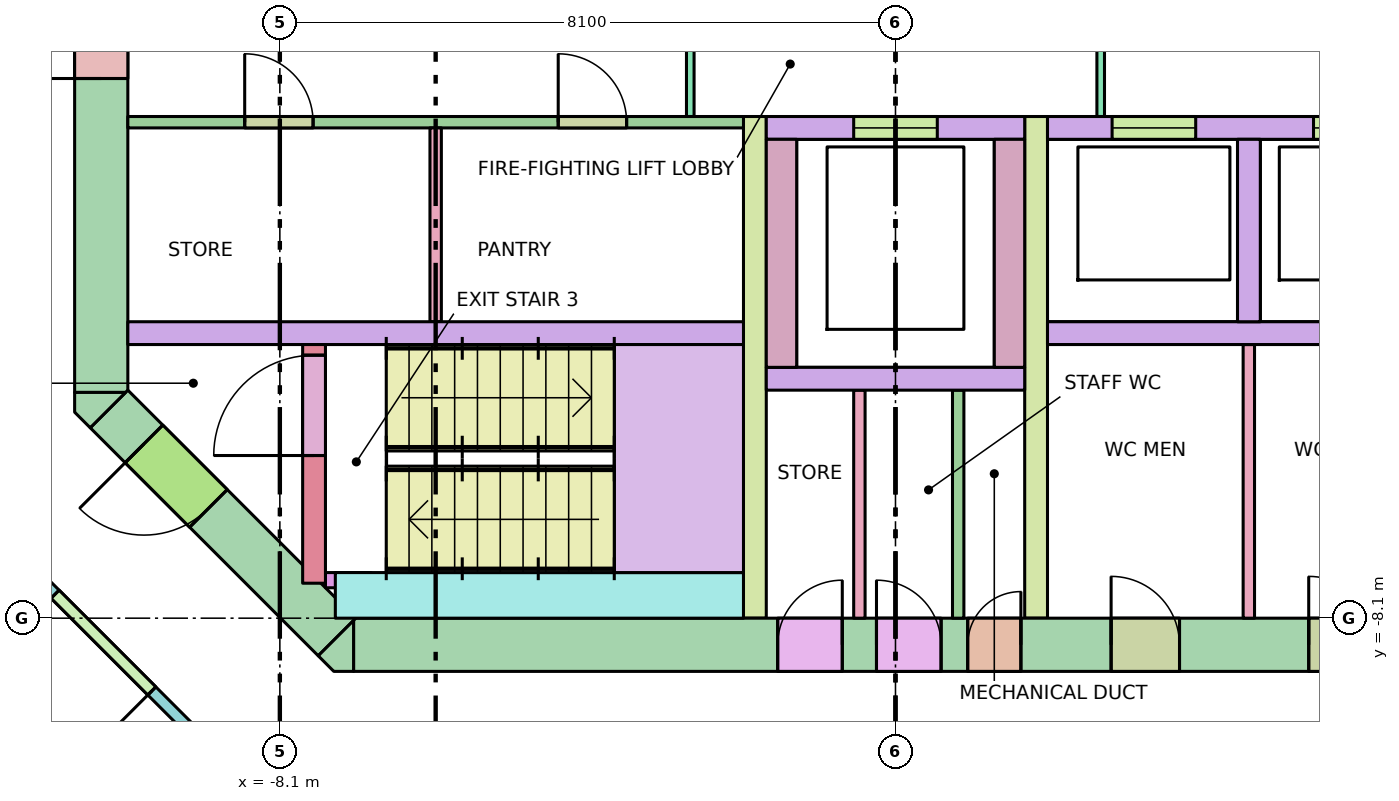
"""IFC4 building model, lengths in metres.
Left out: names, types, materials, properties, quantities, classifications, styles, units other than length and angle.
Written with IfcOpenShell. Run it as: python <this file> out.ifc"""

import sys

from ifc_helpers import new_model, si_unit, direction, frame, frame_2d, origin, place, context, subcontext, project, spatial, polyline, rectangle, outline, extrude, element, fill, save


model = new_model("IFC4")
c1 = context("Model", 3, precision=1e-05, world=origin(), true_north=direction((0.0, 1.0)))
c2 = subcontext(c1, "Body", "Model", "MODEL_VIEW")
j1 = project(units=[si_unit("LENGTHUNIT", "METRE"), si_unit("PLANEANGLEUNIT", "RADIAN")], contexts=[c1])
p1 = place(None, origin())
s1 = spatial("IfcSite", under=j1, at=p1, CompositionType="ELEMENT")
p2 = place(p1, origin())
s2 = spatial("IfcBuilding", under=s1, at=p2, CompositionType="ELEMENT")
p3 = place(p2, frame((0.0, 0.0, 203.9)))
s3 = spatial("IfcBuildingStorey", under=s2, at=p3, CompositionType="ELEMENT", Elevation=203.9)
p4 = place(p3, frame((-7.13, -8.45, -0.28), z_axis=(0.0, 0.0, 1.0), x_axis=(1.0, 0.0, 0.0)))
e1 = element("IfcWall", 1, at=p4, inside=s3, PredefinedType="SHEAR", context=c2, shape_type="SweptSolid", body=[
    extrude(rectangle(XDim=14.26, YDim=0.7, at=frame_2d((7.13, 0.0))), origin(), (0.0, 0.0, 1.0), 3.7),
])
p5 = place(p4, frame((8.08, 0.0, 0.28)))
e2 = element("IfcOpeningElement", 2, at=p5, cuts=e1, PredefinedType="OPENING", context=c2, shape_type="SweptSolid", body=[
    extrude(rectangle(XDim=0.7, YDim=2.1, at=frame_2d((0.35, 1.05))), frame((0.0, 0.36, 0.0), z_axis=(0.0, -1.0, 0.0), x_axis=(1.0, 0.0, 0.0)), (0.0, 0.0, 1.0), 0.72),
])
p6 = place(p4, frame((5.58, 0.0, 0.28)))
e3 = element("IfcOpeningElement", 3, at=p6, cuts=e1, PredefinedType="OPENING", context=c2, shape_type="SweptSolid", body=[
    extrude(rectangle(XDim=0.85, YDim=2.1, at=frame_2d((0.425, 1.05))), frame((0.0, 0.36, 0.0), z_axis=(0.0, -1.0, 0.0), x_axis=(1.0, 0.0, 0.0)), (0.0, 0.0, 1.0), 0.72),
])
p7 = place(p4, frame((6.88, 0.0, 0.28)))
e4 = element("IfcOpeningElement", 4, at=p7, cuts=e1, PredefinedType="OPENING", context=c2, shape_type="SweptSolid", body=[
    extrude(rectangle(XDim=0.85, YDim=2.1, at=frame_2d((0.425, 1.05))), frame((0.0, 0.36, 0.0), z_axis=(0.0, -1.0, 0.0), x_axis=(1.0, 0.0, 0.0)), (0.0, 0.0, 1.0), 0.72),
])
p8 = place(p4, frame((9.967, 0.0, 0.28)))
e5 = element("IfcOpeningElement", 5, at=p8, cuts=e1, PredefinedType="OPENING", context=c2, shape_type="SweptSolid", body=[
    extrude(rectangle(XDim=0.9, YDim=2.1, at=frame_2d((0.45, 1.05))), frame((0.0, 0.36, 0.0), z_axis=(0.0, -1.0, 0.0), x_axis=(1.0, 0.0, 0.0)), (0.0, 0.0, 1.0), 0.72),
])
p9 = place(p4, frame((12.567, 0.0, 0.28)))
e6 = element("IfcOpeningElement", 6, at=p9, cuts=e1, PredefinedType="OPENING", context=c2, shape_type="SweptSolid", body=[
    extrude(rectangle(XDim=0.9, YDim=2.1, at=frame_2d((0.45, 1.05))), frame((0.0, 0.36, 0.0), z_axis=(0.0, -1.0, 0.0), x_axis=(1.0, 0.0, 0.0)), (0.0, 0.0, 1.0), 0.72),
])
p10 = place(p3, frame((-10.45, -5.13, -0.28), z_axis=(0.0, 0.0, 1.0), x_axis=(0.0, 1.0, 0.0)))
e7 = element("IfcWall", 7, at=p10, inside=s3, PredefinedType="SHEAR", context=c2, shape_type="SweptSolid", body=[
    extrude(rectangle(XDim=10.26, YDim=0.7, at=frame_2d((5.13, 0.0))), origin(), (0.0, 0.0, 1.0), 3.7),
])
p11 = place(p10, frame((4.13, 0.0, 0.28)))
e8 = element("IfcOpeningElement", 8, at=p11, cuts=e7, PredefinedType="OPENING", context=c2, shape_type="SweptSolid", body=[
    extrude(rectangle(XDim=2.0, YDim=2.1, at=frame_2d((1.0, 1.05))), frame((0.0, 0.36, 0.0), z_axis=(0.0, -1.0, 0.0), x_axis=(1.0, 0.0, 0.0)), (0.0, 0.0, 1.0), 0.72),
])
p12 = place(p3, frame((-7.347, -8.347, -0.28), z_axis=(0.0, 0.0, 1.0), x_axis=(-0.707106781187, 0.707106781187, 0.0)))
e9 = element("IfcWall", 9, at=p12, inside=s3, PredefinedType="SHEAR", context=c2, shape_type="SweptSolid", body=[
    extrude(rectangle(XDim=4.243, YDim=0.7, at=frame_2d((2.121, 0.0))), origin(), (0.0, 0.0, 1.0), 3.7),
])
p13 = place(p12, frame((2.393, 0.0, 0.28)))
e10 = element("IfcOpeningElement", 10, at=p13, cuts=e9, PredefinedType="OPENING", context=c2, shape_type="SweptSolid", body=[
    extrude(rectangle(XDim=1.2, YDim=2.1, at=frame_2d((0.6, 1.05))), frame((0.0, 0.36, 0.0), z_axis=(0.0, -1.0, 0.0), x_axis=(1.0, 0.0, 0.0)), (0.0, 0.0, 1.0), 0.72),
])
p14 = place(p3, frame((0.0, 0.0, -0.28)))
e11 = element("IfcWall", 11, at=p14, inside=s3, PredefinedType="SHEAR", context=c2, shape_type="SweptSolid", body=[
    extrude(outline(polyline([(-7.39, -8.8), (-7.595, -8.595), (-7.595, -8.595), (-7.595, -8.595), (-7.13, -8.13), (-7.13, -8.8), (-7.13, -8.8), (-7.39, -8.8)])), origin(), (0.0, 0.0, 1.0), 3.7),
])
p15 = place(p3, frame((0.0, 0.0, -0.28)))
e12 = element("IfcWall", 12, at=p15, inside=s3, PredefinedType="SHEAR", context=c2, shape_type="SweptSolid", body=[
    extrude(outline(polyline([(-10.8, -5.39), (-10.8, -5.13), (-10.8, -5.13), (-10.13, -5.13), (-10.595, -5.595), (-10.595, -5.595), (-10.595, -5.595), (-10.8, -5.39)])), origin(), (0.0, 0.0, 1.0), 3.7),
])
for number, where, z_axis, x_axis in (
    (13, (-10.1, -4.35, 0.0), (0.0, 0.0, 1.0), (1.0, 0.0, 0.0)),
    (14, (2.0, -4.35, 0.0), (0.0, 0.0, 1.0), (1.0, 0.0, 0.0)),
):
    element("IfcWall", number, at=place(p3, frame(where, z_axis=z_axis, x_axis=x_axis)), inside=s3, PredefinedType="SOLIDWALL", context=c2, shape_type="SweptSolid", body=[
        extrude(rectangle(XDim=8.1, YDim=0.3, at=frame_2d((4.05, 0.0))), origin(), (0.0, 0.0, 1.0), 3.42),
    ])
p16 = place(p3, frame((2.0, -1.65, 0.0), z_axis=(0.0, 0.0, 1.0), x_axis=(1.0, 0.0, 0.0)))
e15 = element("IfcWall", 15, at=p16, inside=s3, PredefinedType="SOLIDWALL", context=c2, shape_type="SweptSolid", body=[
    extrude(rectangle(XDim=8.1, YDim=0.3, at=frame_2d((4.05, 0.0))), origin(), (0.0, 0.0, 1.0), 3.42),
])
p17 = place(p16, frame((0.85, 0.0, 0.0)))
e16 = element("IfcOpeningElement", 16, at=p17, cuts=e15, PredefinedType="OPENING", context=c2, shape_type="SweptSolid", body=[
    extrude(rectangle(XDim=1.1, YDim=2.1, at=frame_2d((0.55, 1.05))), frame((0.0, 0.16, 0.0), z_axis=(0.0, -1.0, 0.0), x_axis=(1.0, 0.0, 0.0)), (0.0, 0.0, 1.0), 0.32),
])
p18 = place(p16, frame((3.5, 0.0, 0.0)))
e17 = element("IfcOpeningElement", 17, at=p18, cuts=e15, PredefinedType="OPENING", context=c2, shape_type="SweptSolid", body=[
    extrude(rectangle(XDim=1.1, YDim=2.1, at=frame_2d((0.55, 1.05))), frame((0.0, 0.16, 0.0), z_axis=(0.0, -1.0, 0.0), x_axis=(1.0, 0.0, 0.0)), (0.0, 0.0, 1.0), 0.32),
])
p19 = place(p16, frame((6.3, 0.0, 0.0)))
e18 = element("IfcOpeningElement", 18, at=p19, cuts=e15, PredefinedType="OPENING", context=c2, shape_type="SweptSolid", body=[
    extrude(rectangle(XDim=1.1, YDim=2.1, at=frame_2d((0.55, 1.05))), frame((0.0, 0.16, 0.0), z_axis=(0.0, -1.0, 0.0), x_axis=(1.0, 0.0, 0.0)), (0.0, 0.0, 1.0), 0.32),
])
p20 = place(p3, frame((4.65, -4.2, 0.0), z_axis=(0.0, 0.0, 1.0), x_axis=(0.0, 1.0, 0.0)))
e19 = element("IfcWall", 19, at=p20, inside=s3, PredefinedType="SOLIDWALL", context=c2, shape_type="SweptSolid", body=[
    extrude(rectangle(XDim=2.4, YDim=0.3, at=frame_2d((1.2, 0.0))), origin(), (0.0, 0.0, 1.0), 3.42),
])
for number, where, z_axis, x_axis in (
    (20, (-1.85, -8.1, 0.0), (0.0, 0.0, 1.0), (0.0, 1.0, 0.0)),
    (21, (1.85, -8.1, 0.0), (0.0, 0.0, 1.0), (0.0, 1.0, 0.0)),
):
    element("IfcWall", number, at=place(p3, frame(where, z_axis=z_axis, x_axis=x_axis)), inside=s3, PredefinedType="SHEAR", context=c2, shape_type="SweptSolid", body=[
        extrude(rectangle(XDim=6.6, YDim=0.3, at=frame_2d((3.3, 0.0))), origin(), (0.0, 0.0, 1.0), 3.42),
    ])
p21 = place(p3, frame((-1.7, -1.65, 0.0), z_axis=(0.0, 0.0, 1.0), x_axis=(1.0, 0.0, 0.0)))
e22 = element("IfcWall", 22, at=p21, inside=s3, PredefinedType="SOLIDWALL", context=c2, shape_type="SweptSolid", body=[
    extrude(rectangle(XDim=3.4, YDim=0.3, at=frame_2d((1.7, 0.0))), origin(), (0.0, 0.0, 1.0), 3.42),
])
p22 = place(p21, frame((1.15, 0.0, 0.0)))
e23 = element("IfcOpeningElement", 23, at=p22, cuts=e22, PredefinedType="OPENING", context=c2, shape_type="SweptSolid", body=[
    extrude(rectangle(XDim=1.1, YDim=2.1, at=frame_2d((0.55, 1.05))), frame((0.0, 0.16, 0.0), z_axis=(0.0, -1.0, 0.0), x_axis=(1.0, 0.0, 0.0)), (0.0, 0.0, 1.0), 0.32),
])
for number, where, z_axis, x_axis in (
    (24, (-1.5, -4.8, 0.0), (0.0, 0.0, 1.0), (0.0, 1.0, 0.0)),
    (25, (1.5, -4.8, 0.0), (0.0, 0.0, 1.0), (0.0, 1.0, 0.0)),
):
    element("IfcWall", number, at=place(p3, frame(where, z_axis=z_axis, x_axis=x_axis)), inside=s3, PredefinedType="SOLIDWALL", context=c2, shape_type="SweptSolid", body=[
        extrude(rectangle(XDim=3.0, YDim=0.4, at=frame_2d((1.5, 0.0))), origin(), (0.0, 0.0, 1.0), 3.42),
    ])
p23 = place(p3, frame((-1.7, -4.95, 0.0), z_axis=(0.0, 0.0, 1.0), x_axis=(1.0, 0.0, 0.0)))
e26 = element("IfcWall", 26, at=p23, inside=s3, PredefinedType="SOLIDWALL", context=c2, shape_type="SweptSolid", body=[
    extrude(rectangle(XDim=3.4, YDim=0.3, at=frame_2d((1.7, 0.0))), origin(), (0.0, 0.0, 1.0), 3.42),
])
p24 = place(p3, frame((-7.65, -7.64, 0.0), z_axis=(0.0, 0.0, 1.0), x_axis=(0.0, 1.0, 0.0)))
e27 = element("IfcWall", 27, at=p24, inside=s3, PredefinedType="SHEAR", context=c2, shape_type="SweptSolid", body=[
    extrude(rectangle(XDim=3.14, YDim=0.3, at=frame_2d((1.57, 0.0))), origin(), (0.0, 0.0, 1.0), 3.42),
])
p25 = place(p24, frame((1.68, 0.0, 0.0)))
e28 = element("IfcOpeningElement", 28, at=p25, cuts=e27, PredefinedType="OPENING", context=c2, shape_type="SweptSolid", body=[
    extrude(rectangle(XDim=1.32, YDim=2.1, at=frame_2d((0.66, 1.05))), frame((0.0, 0.16, 0.0), z_axis=(0.0, -1.0, 0.0), x_axis=(1.0, 0.0, 0.0)), (0.0, 0.0, 1.0), 0.32),
])
p26 = place(p3, frame((-7.5, -7.6, 0.0), z_axis=(0.0, 0.0, 1.0), x_axis=(1.0, 0.0, 0.0)))
e29 = element("IfcWall", 29, at=p26, inside=s3, PredefinedType="SHEAR", context=c2, shape_type="SweptSolid", body=[
    extrude(rectangle(XDim=0.6, YDim=0.2, at=frame_2d((0.3, 0.0))), origin(), (0.0, 0.0, 1.0), 3.42),
])
p27 = place(p3, frame((-7.37, -7.8, 0.0), z_axis=(0.0, 0.0, 1.0), x_axis=(1.0, 0.0, 0.0)))
e30 = element("IfcWall", 30, at=p27, inside=s3, PredefinedType="SHEAR", context=c2, shape_type="SweptSolid", body=[
    extrude(rectangle(XDim=5.37, YDim=0.6, at=frame_2d((2.685, 0.0))), origin(), (0.0, 0.0, 1.0), 3.42),
])
p28 = place(p3, frame((-2.7, -1.5, 0.0), z_axis=(0.0, 0.0, 1.0), x_axis=(0.0, 1.0, 0.0)))
e31 = element("IfcWall", 31, at=p28, inside=s3, PredefinedType="PARTITIONING", context=c2, shape_type="SweptSolid", body=[
    extrude(rectangle(XDim=3.0, YDim=0.1, at=frame_2d((1.5, 0.0))), origin(), (0.0, 0.0, 1.0), 3.42),
])
p29 = place(p28, frame((0.9, 0.0, 0.0)))
e32 = element("IfcOpeningElement", 32, at=p29, cuts=e31, PredefinedType="OPENING", context=c2, shape_type="SweptSolid", body=[
    extrude(rectangle(XDim=1.2, YDim=2.1, at=frame_2d((0.6, 1.05))), frame((0.0, 0.06, 0.0), z_axis=(0.0, -1.0, 0.0), x_axis=(1.0, 0.0, 0.0)), (0.0, 0.0, 1.0), 0.12),
])
p30 = place(p3, frame((2.7, -1.5, 0.0), z_axis=(0.0, 0.0, 1.0), x_axis=(0.0, 1.0, 0.0)))
e33 = element("IfcWall", 33, at=p30, inside=s3, PredefinedType="PARTITIONING", context=c2, shape_type="SweptSolid", body=[
    extrude(rectangle(XDim=3.0, YDim=0.1, at=frame_2d((1.5, 0.0))), origin(), (0.0, 0.0, 1.0), 3.42),
])
p31 = place(p30, frame((0.9, 0.0, 0.0)))
e34 = element("IfcOpeningElement", 34, at=p31, cuts=e33, PredefinedType="OPENING", context=c2, shape_type="SweptSolid", body=[
    extrude(rectangle(XDim=1.2, YDim=2.1, at=frame_2d((0.6, 1.05))), frame((0.0, 0.06, 0.0), z_axis=(0.0, -1.0, 0.0), x_axis=(1.0, 0.0, 0.0)), (0.0, 0.0, 1.0), 0.12),
])
for number, where, z_axis, x_axis in (
    (35, (0.825, -8.1, 0.0), (0.0, 0.0, 1.0), (0.0, 1.0, 0.0)),
    (36, (-0.475, -8.1, 0.0), (0.0, 0.0, 1.0), (0.0, 1.0, 0.0)),
):
    element("IfcWall", number, at=place(p3, frame(where, z_axis=z_axis, x_axis=x_axis)), inside=s3, PredefinedType="PARTITIONING", context=c2, shape_type="SweptSolid", body=[
        extrude(rectangle(XDim=3.0, YDim=0.15, at=frame_2d((1.5, 0.0))), origin(), (0.0, 0.0, 1.0), 3.42),
    ])
p32 = place(p3, frame((4.649, -8.1, 0.0), z_axis=(0.0, 0.0, 1.0), x_axis=(0.0, 1.0, 0.0)))
e37 = element("IfcWall", 37, at=p32, inside=s3, PredefinedType="PARTITIONING", context=c2, shape_type="SweptSolid", body=[
    extrude(rectangle(XDim=3.6, YDim=0.15, at=frame_2d((1.8, 0.0))), origin(), (0.0, 0.0, 1.0), 3.42),
])
p33 = place(p3, frame((-6.05, -4.2, 0.0), z_axis=(0.0, 0.0, 1.0), x_axis=(0.0, 1.0, 0.0)))
e38 = element("IfcWall", 38, at=p33, inside=s3, PredefinedType="PARTITIONING", context=c2, shape_type="SweptSolid", body=[
    extrude(rectangle(XDim=2.55, YDim=0.15, at=frame_2d((1.275, 0.0))), origin(), (0.0, 0.0, 1.0), 3.42),
])
p34 = place(p3, frame((-10.1, -1.575, 0.0), z_axis=(0.0, 0.0, 1.0), x_axis=(1.0, 0.0, 0.0)))
e39 = element("IfcWall", 39, at=p34, inside=s3, PredefinedType="PARTITIONING", context=c2, shape_type="SweptSolid", body=[
    extrude(rectangle(XDim=8.1, YDim=0.15, at=frame_2d((4.05, 0.0))), origin(), (0.0, 0.0, 1.0), 3.42),
])
p35 = place(p34, frame((1.538, 0.0, 0.0)))
e40 = element("IfcOpeningElement", 40, at=p35, cuts=e39, PredefinedType="OPENING", context=c2, shape_type="SweptSolid", body=[
    extrude(rectangle(XDim=0.9, YDim=2.1, at=frame_2d((0.45, 1.05))), frame((0.0, 0.085, 0.0), z_axis=(0.0, -1.0, 0.0), x_axis=(1.0, 0.0, 0.0)), (0.0, 0.0, 1.0), 0.17),
])
p36 = place(p34, frame((5.663, 0.0, 0.0)))
e41 = element("IfcOpeningElement", 41, at=p36, cuts=e39, PredefinedType="OPENING", context=c2, shape_type="SweptSolid", body=[
    extrude(rectangle(XDim=0.9, YDim=2.1, at=frame_2d((0.45, 1.05))), frame((0.0, 0.085, 0.0), z_axis=(0.0, -1.0, 0.0), x_axis=(1.0, 0.0, 0.0)), (0.0, 0.0, 1.0), 0.17),
])
p37 = place(p3, frame((-8.204, -10.638, 0.0), z_axis=(0.0, 0.0, 1.0), x_axis=(-0.707106781187, 0.707106781187, 0.0)))
e42 = element("IfcWall", 42, at=p37, inside=s3, PredefinedType="PARTITIONING", context=c2, shape_type="SweptSolid", body=[
    extrude(rectangle(XDim=6.271, YDim=0.15, at=frame_2d((3.135, 0.0))), origin(), (0.0, 0.0, 1.0), 2.62),
])
p38 = place(p37, frame((2.235, 0.0, 0.0)))
e43 = element("IfcOpeningElement", 43, at=p38, cuts=e42, PredefinedType="OPENING", context=c2, shape_type="SweptSolid", body=[
    extrude(rectangle(XDim=1.8, YDim=2.1, at=frame_2d((0.9, 1.05))), frame((0.0, 0.085, 0.0), z_axis=(0.0, -1.0, 0.0), x_axis=(1.0, 0.0, 0.0)), (0.0, 0.0, 1.0), 0.17),
])
p39 = place(p17, origin())
e44 = element("IfcDoor", 44, at=p39, inside=s3, OperationType="DOUBLE_DOOR_SLIDING", PredefinedType="DOOR", context=c2, shape_type="SweptSolid", body=[
    extrude(rectangle(XDim=1.1, YDim=2.1, at=frame_2d((0.55, 1.05))), frame((0.0, 0.025, 0.0), z_axis=(0.0, -1.0, 0.0), x_axis=(1.0, 0.0, 0.0)), (0.0, 0.0, 1.0), 0.05),
])
fill(e16, e44)
p40 = place(p18, origin())
e45 = element("IfcDoor", 45, at=p40, inside=s3, OperationType="DOUBLE_DOOR_SLIDING", PredefinedType="DOOR", context=c2, shape_type="SweptSolid", body=[
    extrude(rectangle(XDim=1.1, YDim=2.1, at=frame_2d((0.55, 1.05))), frame((0.0, 0.025, 0.0), z_axis=(0.0, -1.0, 0.0), x_axis=(1.0, 0.0, 0.0)), (0.0, 0.0, 1.0), 0.05),
])
fill(e17, e45)
p41 = place(p22, origin())
e46 = element("IfcDoor", 46, at=p41, inside=s3, OperationType="DOUBLE_DOOR_SLIDING", PredefinedType="DOOR", context=c2, shape_type="SweptSolid", body=[
    extrude(rectangle(XDim=1.1, YDim=2.1, at=frame_2d((0.55, 1.05))), frame((0.0, 0.025, 0.0), z_axis=(0.0, -1.0, 0.0), x_axis=(1.0, 0.0, 0.0)), (0.0, 0.0, 1.0), 0.05),
])
fill(e23, e46)
p42 = place(p25, origin())
e47 = element("IfcDoor", 47, at=p42, inside=s3, OperationType="DOUBLE_DOOR_SINGLE_SWING", PredefinedType="DOOR", context=c2, shape_type="SweptSolid", body=[
    extrude(rectangle(XDim=1.32, YDim=2.1, at=frame_2d((0.66, 1.05))), frame((0.0, 0.025, 0.0), z_axis=(0.0, -1.0, 0.0), x_axis=(1.0, 0.0, 0.0)), (0.0, 0.0, 1.0), 0.05),
])
fill(e28, e47)
p43 = place(p13, origin())
e48 = element("IfcDoor", 48, at=p43, inside=s3, OperationType="SINGLE_SWING_RIGHT", PredefinedType="DOOR", context=c2, shape_type="SweptSolid", body=[
    extrude(rectangle(XDim=1.2, YDim=2.1, at=frame_2d((0.6, 1.05))), frame((0.0, 0.025, 0.0), z_axis=(0.0, -1.0, 0.0), x_axis=(1.0, 0.0, 0.0)), (0.0, 0.0, 1.0), 0.05),
])
fill(e10, e48)
p44 = place(p11, origin())
e49 = element("IfcDoor", 49, at=p44, inside=s3, OperationType="DOUBLE_DOOR_SINGLE_SWING", PredefinedType="DOOR", context=c2, shape_type="SweptSolid", body=[
    extrude(rectangle(XDim=2.0, YDim=2.1, at=frame_2d((1.0, 1.05))), frame((0.0, 0.025, 0.0), z_axis=(0.0, -1.0, 0.0), x_axis=(1.0, 0.0, 0.0)), (0.0, 0.0, 1.0), 0.05),
])
fill(e8, e49)
p45 = place(p5, origin())
e50 = element("IfcDoor", 50, at=p45, inside=s3, OperationType="SINGLE_SWING_RIGHT", PredefinedType="DOOR", context=c2, shape_type="SweptSolid", body=[
    extrude(rectangle(XDim=0.7, YDim=2.1, at=frame_2d((0.35, 1.05))), frame((0.0, 0.025, 0.0), z_axis=(0.0, -1.0, 0.0), x_axis=(1.0, 0.0, 0.0)), (0.0, 0.0, 1.0), 0.05),
])
fill(e2, e50)
p46 = place(p6, origin())
e51 = element("IfcDoor", 51, at=p46, inside=s3, OperationType="SINGLE_SWING_RIGHT", PredefinedType="DOOR", context=c2, shape_type="SweptSolid", body=[
    extrude(rectangle(XDim=0.85, YDim=2.1, at=frame_2d((0.425, 1.05))), frame((0.0, 0.025, 0.0), z_axis=(0.0, -1.0, 0.0), x_axis=(1.0, 0.0, 0.0)), (0.0, 0.0, 1.0), 0.05),
])
fill(e3, e51)
p47 = place(p7, origin())
e52 = element("IfcDoor", 52, at=p47, inside=s3, OperationType="SINGLE_SWING_LEFT", PredefinedType="DOOR", context=c2, shape_type="SweptSolid", body=[
    extrude(rectangle(XDim=0.85, YDim=2.1, at=frame_2d((0.425, 1.05))), frame((0.0, 0.025, 0.0), z_axis=(0.0, -1.0, 0.0), x_axis=(1.0, 0.0, 0.0)), (0.0, 0.0, 1.0), 0.05),
])
fill(e4, e52)
p48 = place(p8, origin())
e53 = element("IfcDoor", 53, at=p48, inside=s3, OperationType="SINGLE_SWING_LEFT", PredefinedType="DOOR", context=c2, shape_type="SweptSolid", body=[
    extrude(rectangle(XDim=0.9, YDim=2.1, at=frame_2d((0.45, 1.05))), frame((0.0, 0.025, 0.0), z_axis=(0.0, -1.0, 0.0), x_axis=(1.0, 0.0, 0.0)), (0.0, 0.0, 1.0), 0.05),
])
fill(e5, e53)
p49 = place(p9, origin())
e54 = element("IfcDoor", 54, at=p49, inside=s3, OperationType="SINGLE_SWING_LEFT", PredefinedType="DOOR", context=c2, shape_type="SweptSolid", body=[
    extrude(rectangle(XDim=0.9, YDim=2.1, at=frame_2d((0.45, 1.05))), frame((0.0, 0.025, 0.0), z_axis=(0.0, -1.0, 0.0), x_axis=(1.0, 0.0, 0.0)), (0.0, 0.0, 1.0), 0.05),
])
fill(e6, e54)
p50 = place(p35, origin())
e55 = element("IfcDoor", 55, at=p50, inside=s3, OperationType="SINGLE_SWING_LEFT", PredefinedType="DOOR", context=c2, shape_type="SweptSolid", body=[
    extrude(rectangle(XDim=0.9, YDim=2.1, at=frame_2d((0.45, 1.05))), frame((0.0, 0.025, 0.0), z_axis=(0.0, -1.0, 0.0), x_axis=(1.0, 0.0, 0.0)), (0.0, 0.0, 1.0), 0.05),
])
fill(e40, e55)
p51 = place(p36, origin())
e56 = element("IfcDoor", 56, at=p51, inside=s3, OperationType="SINGLE_SWING_LEFT", PredefinedType="DOOR", context=c2, shape_type="SweptSolid", body=[
    extrude(rectangle(XDim=0.9, YDim=2.1, at=frame_2d((0.45, 1.05))), frame((0.0, 0.025, 0.0), z_axis=(0.0, -1.0, 0.0), x_axis=(1.0, 0.0, 0.0)), (0.0, 0.0, 1.0), 0.05),
])
fill(e41, e56)
p52 = place(p38, origin())
e57 = element("IfcDoor", 57, at=p52, inside=s3, OperationType="DOUBLE_DOOR_SINGLE_SWING", PredefinedType="DOOR", context=c2, shape_type="SweptSolid", body=[
    extrude(rectangle(XDim=1.8, YDim=2.1, at=frame_2d((0.9, 1.05))), frame((0.0, 0.025, 0.0), z_axis=(0.0, -1.0, 0.0), x_axis=(1.0, 0.0, 0.0)), (0.0, 0.0, 1.0), 0.05),
])
fill(e43, e57)
save(model, sys.argv[1])
